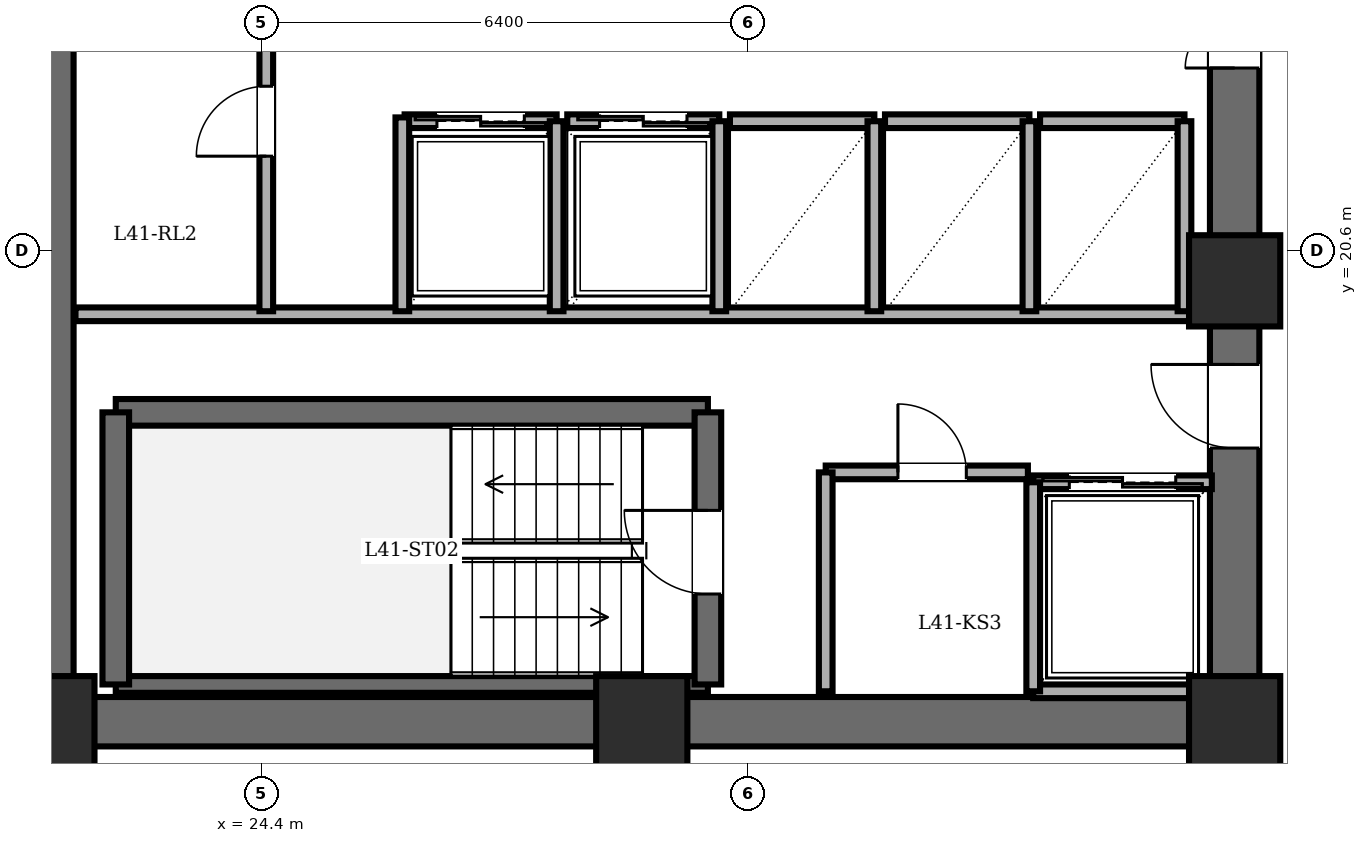
"""IFC4 building model, lengths in metres.
Left out: names, types, materials, properties, quantities, classifications, styles, units other than length and angle.
Written with IfcOpenShell. Run it as: python <this file> out.ifc"""

import sys

from ifc_helpers import new_model, si_unit, direction, frame, frame_2d, origin, origin_2d, place, context, subcontext, project, spatial, rectangle, extrude, element, fill, save


model = new_model("IFC4")
c1 = context("Model", 3, precision=1e-05, world=origin(), true_north=direction((0.0, 1.0)))
c2 = subcontext(c1, "Body", "Model", "MODEL_VIEW")
j1 = project(units=[si_unit("LENGTHUNIT", "METRE"), si_unit("PLANEANGLEUNIT", "RADIAN")], contexts=[c1])
p1 = place(None, origin())
s1 = spatial("IfcSite", under=j1, at=p1, CompositionType="ELEMENT")
p2 = place(p1, origin())
s2 = spatial("IfcBuilding", under=s1, at=p2, CompositionType="ELEMENT")
p3 = place(p2, frame((0.0, 0.0, 158.2)))
s3 = spatial("IfcBuildingStorey", under=s2, at=p3, CompositionType="ELEMENT", Elevation=158.2)
for number, where, z_axis, x_axis in (
    (1, (21.6, 14.4, 0.0), (0.0, 0.0, 1.0), (1.0, 0.0, 0.0)),
    (2, (29.4, 14.4, 0.0), (0.0, 0.0, 1.0), (1.0, 0.0, 0.0)),
    (3, (37.2, 14.4, 0.0), (0.0, 0.0, 1.0), (1.0, 0.0, 0.0)),
    (4, (37.2, 20.2, 0.0), (0.0, 0.0, 1.0), (1.0, 0.0, 0.0)),
):
    element("IfcColumn", number, at=place(p3, frame(where, z_axis=z_axis, x_axis=x_axis)), inside=s3, PredefinedType="COLUMN", context=c2, shape_type="SweptSolid", body=[
        extrude(rectangle(XDim=1.2, YDim=1.2, at=origin_2d()), origin(), (0.0, 0.0, 1.0), 3.6),
    ])
p4 = place(p3, frame((21.6, 14.4, 0.0), z_axis=(0.0, 0.0, 1.0), x_axis=(0.0, 1.0, 0.0)))
e5 = element("IfcWall", 5, at=p4, inside=s3, PredefinedType="SHEAR", context=c2, shape_type="SweptSolid", body=[
    extrude(rectangle(XDim=19.2, YDim=0.65, at=frame_2d((9.6, 0.0))), origin(), (0.0, 0.0, 1.0), 3.4),
])
p5 = place(p3, frame((37.2, 14.4, 0.0), z_axis=(0.0, 0.0, 1.0), x_axis=(-1.0, 0.0, 0.0)))
e6 = element("IfcWall", 6, at=p5, inside=s3, PredefinedType="SHEAR", context=c2, shape_type="SweptSolid", body=[
    extrude(rectangle(XDim=15.6, YDim=0.65, at=frame_2d((7.8, 0.0))), origin(), (0.0, 0.0, 1.0), 3.4),
])
p6 = place(p3, frame((37.2, 14.4, 0.0), z_axis=(0.0, 0.0, 1.0), x_axis=(0.0, 1.0, 0.0)))
e7 = element("IfcWall", 7, at=p6, inside=s3, PredefinedType="SHEAR", context=c2, shape_type="SweptSolid", body=[
    extrude(rectangle(XDim=19.2, YDim=0.65, at=frame_2d((9.6, 0.0))), origin(), (0.0, 0.0, 1.0), 3.4),
])
p7 = place(p6, frame((15.8, 0.0, 0.0)))
e8 = element("IfcOpeningElement", 8, at=p7, cuts=e7, PredefinedType="OPENING", context=c2, shape_type="SweptSolid", body=[
    extrude(rectangle(XDim=1.15, YDim=2.15, at=frame_2d((0.575, 1.075))), frame((0.0, 0.335, 0.0), z_axis=(0.0, -1.0, 0.0), x_axis=(1.0, 0.0, 0.0)), (0.0, 0.0, 1.0), 0.67),
])
p8 = place(p6, frame((3.6, 0.0, 0.0)))
e9 = element("IfcOpeningElement", 9, at=p8, cuts=e7, PredefinedType="OPENING", context=c2, shape_type="SweptSolid", body=[
    extrude(rectangle(XDim=1.1, YDim=2.15, at=frame_2d((0.55, 1.075))), frame((0.0, 0.335, 0.0), z_axis=(0.0, -1.0, 0.0), x_axis=(1.0, 0.0, 0.0)), (0.0, 0.0, 1.0), 0.67),
])
p9 = place(p6, frame((8.6, 0.0, 0.0)))
e10 = element("IfcOpeningElement", 10, at=p9, cuts=e7, PredefinedType="OPENING", context=c2, shape_type="SweptSolid", body=[
    extrude(rectangle(XDim=1.3, YDim=2.2, at=frame_2d((0.65, 1.1))), frame((0.0, 0.335, 0.0), z_axis=(0.0, -1.0, 0.0), x_axis=(1.0, 0.0, 0.0)), (0.0, 0.0, 1.0), 0.67),
])
p10 = place(p3, frame((22.48, 18.47, 0.0), z_axis=(0.0, 0.0, 1.0), x_axis=(1.0, 0.0, 0.0)))
e11 = element("IfcWall", 11, at=p10, inside=s3, PredefinedType="SOLIDWALL", context=c2, shape_type="SweptSolid", body=[
    extrude(rectangle(XDim=7.79, YDim=0.35, at=frame_2d((3.895, 0.0))), origin(), (0.0, 0.0, 1.0), 3.4),
])
p11 = place(p3, frame((22.48, 14.89, 0.0), z_axis=(0.0, 0.0, 1.0), x_axis=(1.0, 0.0, 0.0)))
e12 = element("IfcWall", 12, at=p11, inside=s3, PredefinedType="PARTITIONING", context=c2, shape_type="SweptSolid", body=[
    extrude(rectangle(XDim=7.79, YDim=0.22, at=frame_2d((3.895, 0.0))), origin(), (0.0, 0.0, 1.0), 3.4),
])
p12 = place(p3, frame((22.48, 14.89, 0.0), z_axis=(0.0, 0.0, 1.0), x_axis=(0.0, 1.0, 0.0)))
e13 = element("IfcWall", 13, at=p12, inside=s3, PredefinedType="SOLIDWALL", context=c2, shape_type="SweptSolid", body=[
    extrude(rectangle(XDim=3.58, YDim=0.35, at=frame_2d((1.79, 0.0))), origin(), (0.0, 0.0, 1.0), 3.4),
])
p13 = place(p3, frame((30.27, 14.89, 0.0), z_axis=(0.0, 0.0, 1.0), x_axis=(0.0, 1.0, 0.0)))
e14 = element("IfcWall", 14, at=p13, inside=s3, PredefinedType="SOLIDWALL", context=c2, shape_type="SweptSolid", body=[
    extrude(rectangle(XDim=3.58, YDim=0.35, at=frame_2d((1.79, 0.0))), origin(), (0.0, 0.0, 1.0), 3.4),
])
p14 = place(p13, frame((1.19, 0.0, 0.0)))
e15 = element("IfcOpeningElement", 15, at=p14, cuts=e14, PredefinedType="OPENING", context=c2, shape_type="SweptSolid", body=[
    extrude(rectangle(XDim=1.1, YDim=2.15, at=frame_2d((0.55, 1.075))), frame((0.0, 0.185, 0.0), z_axis=(0.0, -1.0, 0.0), x_axis=(1.0, 0.0, 0.0)), (0.0, 0.0, 1.0), 0.37),
])
p15 = place(p3, frame((21.95, 19.76, 0.0), z_axis=(0.0, 0.0, 1.0), x_axis=(1.0, 0.0, 0.0)))
e16 = element("IfcWall", 16, at=p15, inside=s3, PredefinedType="PARTITIONING", context=c2, shape_type="SweptSolid", body=[
    extrude(rectangle(XDim=14.87, YDim=0.18, at=frame_2d((7.435, 0.0))), origin(), (0.0, 0.0, 1.0), 3.4),
])
p16 = place(p3, frame((31.82, 17.68, 0.0), z_axis=(0.0, 0.0, 1.0), x_axis=(1.0, 0.0, 0.0)))
e17 = element("IfcWall", 17, at=p16, inside=s3, PredefinedType="PARTITIONING", context=c2, shape_type="SweptSolid", body=[
    extrude(rectangle(XDim=2.66, YDim=0.18, at=frame_2d((1.33, 0.0))), origin(), (0.0, 0.0, 1.0), 3.4),
])
p17 = place(p16, frame((0.95, 0.0, 0.0)))
e18 = element("IfcOpeningElement", 18, at=p17, cuts=e17, PredefinedType="OPENING", context=c2, shape_type="SweptSolid", body=[
    extrude(rectangle(XDim=0.9, YDim=2.05, at=frame_2d((0.45, 1.025))), frame((0.0, 0.1, 0.0), z_axis=(0.0, -1.0, 0.0), x_axis=(1.0, 0.0, 0.0)), (0.0, 0.0, 1.0), 0.2),
])
p18 = place(p3, frame((31.82, 14.8, 0.0), z_axis=(0.0, 0.0, 1.0), x_axis=(0.0, 1.0, 0.0)))
e19 = element("IfcWall", 19, at=p18, inside=s3, PredefinedType="PARTITIONING", context=c2, shape_type="SweptSolid", body=[
    extrude(rectangle(XDim=2.88, YDim=0.18, at=frame_2d((1.44, 0.0))), origin(), (0.0, 0.0, 1.0), 3.4),
])
p19 = place(p3, frame((34.55, 17.55, 0.0), z_axis=(0.0, 0.0, 1.0), x_axis=(1.0, 0.0, 0.0)))
e20 = element("IfcWall", 20, at=p19, inside=s3, PredefinedType="PARTITIONING", context=c2, shape_type="SweptSolid", body=[
    extrude(rectangle(XDim=2.35, YDim=0.18, at=frame_2d((1.175, 0.0))), origin(), (0.0, 0.0, 1.0), 3.4),
])
p20 = place(p19, frame((0.475, 0.0, 0.0)))
e21 = element("IfcOpeningElement", 21, at=p20, cuts=e20, PredefinedType="OPENING", context=c2, shape_type="SweptSolid", body=[
    extrude(rectangle(XDim=1.4, YDim=2.3, at=frame_2d((0.7, 1.15))), frame((0.0, 0.1, 0.0), z_axis=(0.0, -1.0, 0.0), x_axis=(1.0, 0.0, 0.0)), (0.0, 0.0, 1.0), 0.2),
])
p21 = place(p3, frame((36.9, 14.8, 0.0), z_axis=(0.0, 0.0, 1.0), x_axis=(-1.0, 0.0, 0.0)))
e22 = element("IfcWall", 22, at=p21, inside=s3, PredefinedType="PARTITIONING", context=c2, shape_type="SweptSolid", body=[
    extrude(rectangle(XDim=2.35, YDim=0.18, at=frame_2d((1.175, 0.0))), origin(), (0.0, 0.0, 1.0), 3.4),
])
p22 = place(p3, frame((34.55, 17.55, 0.0), z_axis=(0.0, 0.0, 1.0), x_axis=(0.0, -1.0, 0.0)))
e23 = element("IfcWall", 23, at=p22, inside=s3, PredefinedType="PARTITIONING", context=c2, shape_type="SweptSolid", body=[
    extrude(rectangle(XDim=2.75, YDim=0.18, at=frame_2d((1.375, 0.0))), origin(), (0.0, 0.0, 1.0), 3.4),
])
p23 = place(p3, frame((26.28, 22.3, 0.0), z_axis=(0.0, 0.0, 1.0), x_axis=(1.0, 0.0, 0.0)))
e24 = element("IfcWall", 24, at=p23, inside=s3, PredefinedType="PARTITIONING", context=c2, shape_type="SweptSolid", body=[
    extrude(rectangle(XDim=2.0, YDim=0.18, at=frame_2d((1.0, 0.0))), origin(), (0.0, 0.0, 1.0), 3.4),
])
p24 = place(p23, frame((0.425, 0.0, 0.0)))
e25 = element("IfcOpeningElement", 25, at=p24, cuts=e24, PredefinedType="OPENING", context=c2, shape_type="SweptSolid", body=[
    extrude(rectangle(XDim=1.15, YDim=2.2, at=frame_2d((0.575, 1.1))), frame((0.0, 0.1, 0.0), z_axis=(0.0, -1.0, 0.0), x_axis=(1.0, 0.0, 0.0)), (0.0, 0.0, 1.0), 0.2),
])
p25 = place(p3, frame((28.28, 19.8, 0.0), z_axis=(0.0, 0.0, 1.0), x_axis=(0.0, 1.0, 0.0)))
e26 = element("IfcWall", 26, at=p25, inside=s3, PredefinedType="PARTITIONING", context=c2, shape_type="SweptSolid", body=[
    extrude(rectangle(XDim=2.5, YDim=0.18, at=frame_2d((1.25, 0.0))), origin(), (0.0, 0.0, 1.0), 3.4),
])
p26 = place(p3, frame((28.42, 22.3, 0.0), z_axis=(0.0, 0.0, 1.0), x_axis=(1.0, 0.0, 0.0)))
e27 = element("IfcWall", 27, at=p26, inside=s3, PredefinedType="PARTITIONING", context=c2, shape_type="SweptSolid", body=[
    extrude(rectangle(XDim=2.0, YDim=0.18, at=frame_2d((1.0, 0.0))), origin(), (0.0, 0.0, 1.0), 3.4),
])
p27 = place(p26, frame((0.425, 0.0, 0.0)))
e28 = element("IfcOpeningElement", 28, at=p27, cuts=e27, PredefinedType="OPENING", context=c2, shape_type="SweptSolid", body=[
    extrude(rectangle(XDim=1.15, YDim=2.2, at=frame_2d((0.575, 1.1))), frame((0.0, 0.1, 0.0), z_axis=(0.0, -1.0, 0.0), x_axis=(1.0, 0.0, 0.0)), (0.0, 0.0, 1.0), 0.2),
])
p28 = place(p3, frame((30.42, 19.8, 0.0), z_axis=(0.0, 0.0, 1.0), x_axis=(0.0, 1.0, 0.0)))
e29 = element("IfcWall", 29, at=p28, inside=s3, PredefinedType="PARTITIONING", context=c2, shape_type="SweptSolid", body=[
    extrude(rectangle(XDim=2.5, YDim=0.18, at=frame_2d((1.25, 0.0))), origin(), (0.0, 0.0, 1.0), 3.4),
])
p29 = place(p3, frame((30.56, 22.3, 0.0), z_axis=(0.0, 0.0, 1.0), x_axis=(1.0, 0.0, 0.0)))
e30 = element("IfcWall", 30, at=p29, inside=s3, PredefinedType="PARTITIONING", context=c2, shape_type="SweptSolid", body=[
    extrude(rectangle(XDim=1.9, YDim=0.18, at=frame_2d((0.95, 0.0))), origin(), (0.0, 0.0, 1.0), 3.4),
])
p30 = place(p3, frame((32.46, 19.8, 0.0), z_axis=(0.0, 0.0, 1.0), x_axis=(0.0, 1.0, 0.0)))
e31 = element("IfcWall", 31, at=p30, inside=s3, PredefinedType="PARTITIONING", context=c2, shape_type="SweptSolid", body=[
    extrude(rectangle(XDim=2.5, YDim=0.18, at=frame_2d((1.25, 0.0))), origin(), (0.0, 0.0, 1.0), 3.4),
])
p31 = place(p3, frame((32.6, 22.3, 0.0), z_axis=(0.0, 0.0, 1.0), x_axis=(1.0, 0.0, 0.0)))
e32 = element("IfcWall", 32, at=p31, inside=s3, PredefinedType="PARTITIONING", context=c2, shape_type="SweptSolid", body=[
    extrude(rectangle(XDim=1.9, YDim=0.18, at=frame_2d((0.95, 0.0))), origin(), (0.0, 0.0, 1.0), 3.4),
])
p32 = place(p3, frame((34.5, 19.8, 0.0), z_axis=(0.0, 0.0, 1.0), x_axis=(0.0, 1.0, 0.0)))
e33 = element("IfcWall", 33, at=p32, inside=s3, PredefinedType="PARTITIONING", context=c2, shape_type="SweptSolid", body=[
    extrude(rectangle(XDim=2.5, YDim=0.18, at=frame_2d((1.25, 0.0))), origin(), (0.0, 0.0, 1.0), 3.4),
])
p33 = place(p3, frame((34.64, 22.3, 0.0), z_axis=(0.0, 0.0, 1.0), x_axis=(1.0, 0.0, 0.0)))
e34 = element("IfcWall", 34, at=p33, inside=s3, PredefinedType="PARTITIONING", context=c2, shape_type="SweptSolid", body=[
    extrude(rectangle(XDim=1.9, YDim=0.18, at=frame_2d((0.95, 0.0))), origin(), (0.0, 0.0, 1.0), 3.4),
])
p34 = place(p3, frame((36.54, 19.8, 0.0), z_axis=(0.0, 0.0, 1.0), x_axis=(0.0, 1.0, 0.0)))
e35 = element("IfcWall", 35, at=p34, inside=s3, PredefinedType="PARTITIONING", context=c2, shape_type="SweptSolid", body=[
    extrude(rectangle(XDim=2.5, YDim=0.18, at=frame_2d((1.25, 0.0))), origin(), (0.0, 0.0, 1.0), 3.4),
])
p35 = place(p3, frame((24.46, 19.8, 0.0), z_axis=(0.0, 0.0, 1.0), x_axis=(0.0, 1.0, 0.0)))
e36 = element("IfcWall", 36, at=p35, inside=s3, PredefinedType="PARTITIONING", context=c2, shape_type="SweptSolid", body=[
    extrude(rectangle(XDim=5.0, YDim=0.18, at=frame_2d((2.5, 0.0))), origin(), (0.0, 0.0, 1.0), 3.4),
])
p36 = place(p35, frame((2.04, 0.0, 0.0)))
e37 = element("IfcOpeningElement", 37, at=p36, cuts=e36, PredefinedType="OPENING", context=c2, shape_type="SweptSolid", body=[
    extrude(rectangle(XDim=0.92, YDim=2.1, at=frame_2d((0.46, 1.05))), frame((0.0, 0.1, 0.0), z_axis=(0.0, -1.0, 0.0), x_axis=(1.0, 0.0, 0.0)), (0.0, 0.0, 1.0), 0.2),
])
p37 = place(p3, frame((26.25, 19.8, 0.0), z_axis=(0.0, 0.0, 1.0), x_axis=(0.0, 1.0, 0.0)))
e38 = element("IfcWall", 38, at=p37, inside=s3, PredefinedType="PARTITIONING", context=c2, shape_type="SweptSolid", body=[
    extrude(rectangle(XDim=2.55, YDim=0.18, at=frame_2d((1.275, 0.0))), origin(), (0.0, 0.0, 1.0), 3.4),
])
p38 = place(p14, origin())
e39 = element("IfcDoor", 39, at=p38, inside=s3, OperationType="SINGLE_SWING_RIGHT", PredefinedType="DOOR", context=c2, shape_type="SweptSolid", body=[
    extrude(rectangle(XDim=1.1, YDim=2.15, at=frame_2d((0.55, 1.075))), frame((0.0, 0.025, 0.0), z_axis=(0.0, -1.0, 0.0), x_axis=(1.0, 0.0, 0.0)), (0.0, 0.0, 1.0), 0.05),
])
fill(e15, e39)
p39 = place(p8, origin())
e40 = element("IfcDoor", 40, at=p39, inside=s3, OperationType="SINGLE_SWING_RIGHT", PredefinedType="DOOR", context=c2, shape_type="SweptSolid", body=[
    extrude(rectangle(XDim=1.1, YDim=2.15, at=frame_2d((0.55, 1.075))), frame((0.0, 0.025, 0.0), z_axis=(0.0, -1.0, 0.0), x_axis=(1.0, 0.0, 0.0)), (0.0, 0.0, 1.0), 0.05),
])
fill(e9, e40)
p40 = place(p17, origin())
e41 = element("IfcDoor", 41, at=p40, inside=s3, OperationType="SINGLE_SWING_LEFT", PredefinedType="DOOR", context=c2, shape_type="SweptSolid", body=[
    extrude(rectangle(XDim=0.9, YDim=2.05, at=frame_2d((0.45, 1.025))), frame((0.0, 0.025, 0.0), z_axis=(0.0, -1.0, 0.0), x_axis=(1.0, 0.0, 0.0)), (0.0, 0.0, 1.0), 0.05),
])
fill(e18, e41)
p41 = place(p20, origin())
e42 = element("IfcDoor", 42, at=p41, inside=s3, OperationType="DOUBLE_DOOR_SLIDING", PredefinedType="DOOR", context=c2, shape_type="SweptSolid", body=[
    extrude(rectangle(XDim=1.4, YDim=2.3, at=frame_2d((0.7, 1.15))), frame((0.0, 0.025, 0.0), z_axis=(0.0, -1.0, 0.0), x_axis=(1.0, 0.0, 0.0)), (0.0, 0.0, 1.0), 0.05),
])
fill(e21, e42)
p42 = place(p24, origin())
e43 = element("IfcDoor", 43, at=p42, inside=s3, OperationType="DOUBLE_DOOR_SLIDING", PredefinedType="DOOR", context=c2, shape_type="SweptSolid", body=[
    extrude(rectangle(XDim=1.15, YDim=2.2, at=frame_2d((0.575, 1.1))), frame((0.0, 0.025, 0.0), z_axis=(0.0, -1.0, 0.0), x_axis=(1.0, 0.0, 0.0)), (0.0, 0.0, 1.0), 0.05),
])
fill(e25, e43)
p43 = place(p27, origin())
e44 = element("IfcDoor", 44, at=p43, inside=s3, OperationType="DOUBLE_DOOR_SLIDING", PredefinedType="DOOR", context=c2, shape_type="SweptSolid", body=[
    extrude(rectangle(XDim=1.15, YDim=2.2, at=frame_2d((0.575, 1.1))), frame((0.0, 0.025, 0.0), z_axis=(0.0, -1.0, 0.0), x_axis=(1.0, 0.0, 0.0)), (0.0, 0.0, 1.0), 0.05),
])
fill(e28, e44)
p44 = place(p36, origin())
e45 = element("IfcDoor", 45, at=p44, inside=s3, OperationType="SINGLE_SWING_LEFT", PredefinedType="DOOR", context=c2, shape_type="SweptSolid", body=[
    extrude(rectangle(XDim=0.92, YDim=2.1, at=frame_2d((0.46, 1.05))), frame((0.0, 0.025, 0.0), z_axis=(0.0, -1.0, 0.0), x_axis=(1.0, 0.0, 0.0)), (0.0, 0.0, 1.0), 0.05),
])
fill(e37, e45)
p45 = place(p9, origin())
e46 = element("IfcDoor", 46, at=p45, inside=s3, OperationType="DOUBLE_DOOR_SINGLE_SWING", PredefinedType="DOOR", context=c2, shape_type="SweptSolid", body=[
    extrude(rectangle(XDim=1.3, YDim=2.2, at=frame_2d((0.65, 1.1))), frame((0.0, 0.025, 0.0), z_axis=(0.0, -1.0, 0.0), x_axis=(1.0, 0.0, 0.0)), (0.0, 0.0, 1.0), 0.05),
])
fill(e10, e46)
save(model, sys.argv[1])
